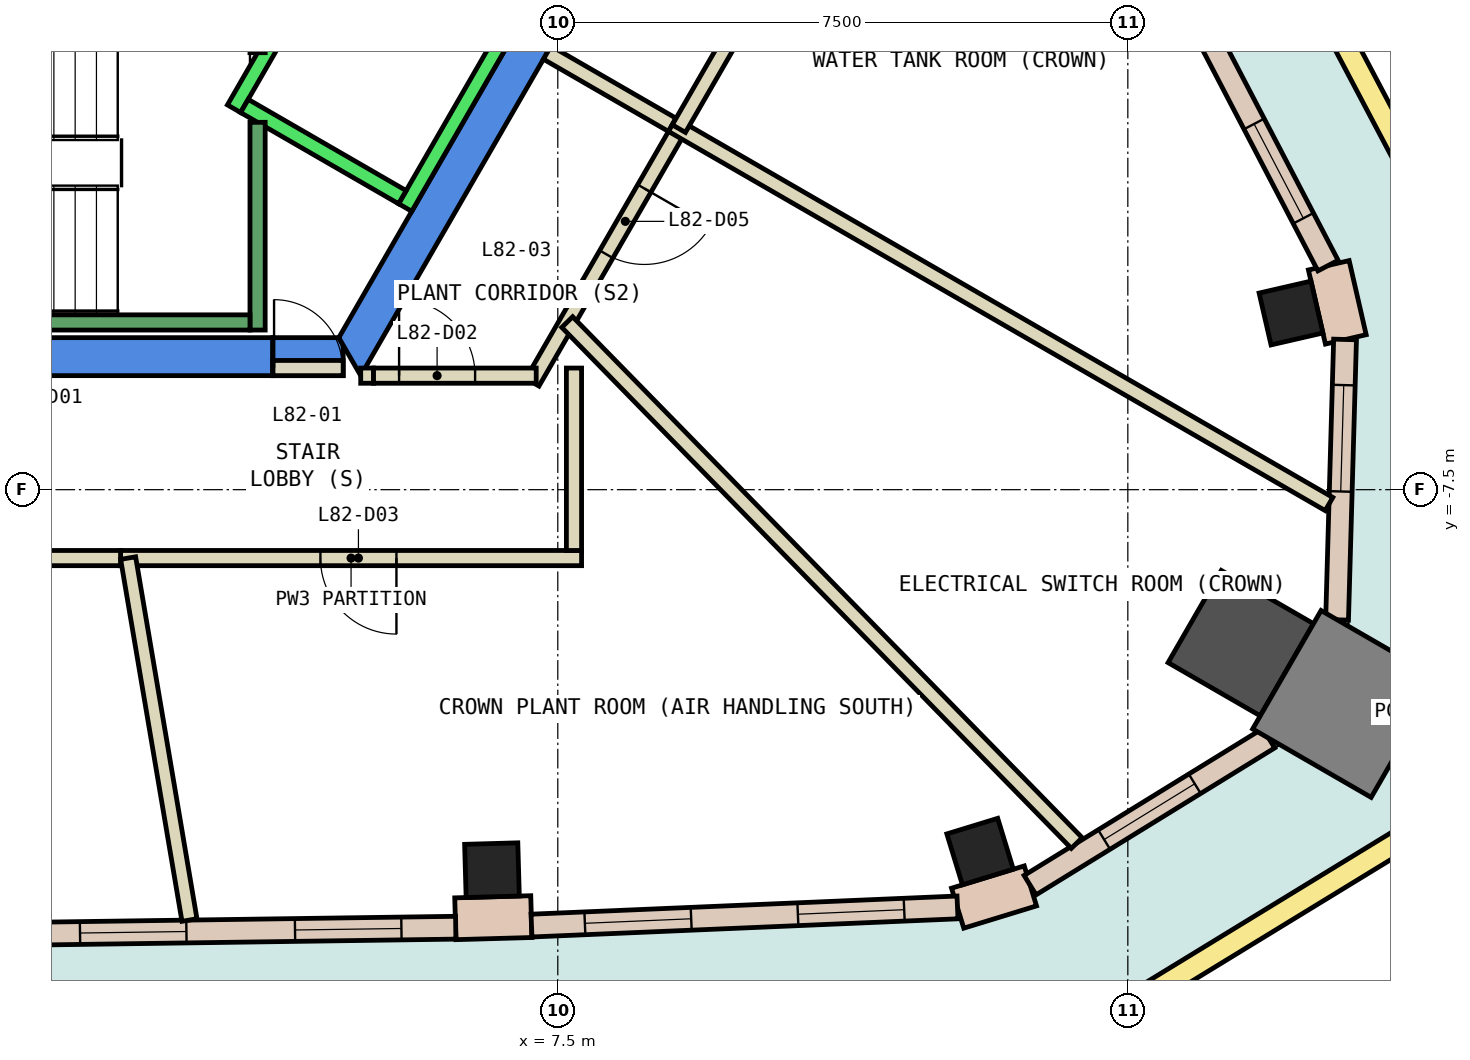
"""IFC4 building model, lengths in metres.
Left out: names, types, materials, properties, quantities, classifications, styles, units other than length and angle.
Written with IfcOpenShell. Run it as: python <this file> out.ifc"""

import sys

from ifc_helpers import new_model, si_unit, direction, frame, frame_2d, origin, origin_2d, place, context, subcontext, project, spatial, polyline, rectangle, outline, extrude, element, fill, save


model = new_model("IFC4")
c1 = context("Model", 3, precision=1e-05, world=origin(), true_north=direction((0.0, 1.0)))
c2 = subcontext(c1, "Body", "Model", "MODEL_VIEW")
j1 = project(units=[si_unit("LENGTHUNIT", "METRE"), si_unit("PLANEANGLEUNIT", "RADIAN")], contexts=[c1])
p1 = place(None, origin())
s1 = spatial("IfcSite", under=j1, at=p1, CompositionType="ELEMENT")
p2 = place(p1, origin())
s2 = spatial("IfcBuilding", under=s1, at=p2, CompositionType="ELEMENT")
p3 = place(p2, frame((0.0, 0.0, 349.4)))
s3 = spatial("IfcBuildingStorey", under=s2, at=p3, CompositionType="ELEMENT", Elevation=349.4)
for number, where, z_axis, x_axis in (
    (1, (6.634, -12.506, 0.0), (0.0, 0.0, 1.0), (1.0, 0.028, 0.0)),
    (2, (13.056, -12.261, 0.0), (0.0, 0.0, 1.0), (0.956, 0.293, 0.0)),
):
    element("IfcColumn", number, at=place(p3, frame(where, z_axis=z_axis, x_axis=x_axis)), inside=s3, PredefinedType="COLUMN", context=c2, shape_type="SweptSolid", body=[
        extrude(rectangle(XDim=0.7, YDim=0.7, at=origin_2d()), origin(), (0.0, 0.0, 1.0), 4.15),
    ])
p4 = place(p3, frame((16.486, -9.519, 0.0), z_axis=(0.0, 0.0, 1.0), x_axis=(-0.866025403784, 0.5, 0.0)))
e3 = element("IfcColumn", 3, at=p4, inside=s3, PredefinedType="COLUMN", context=c2, shape_type="SweptSolid", body=[
    extrude(rectangle(XDim=1.4, YDim=1.4, at=origin_2d()), origin(), (0.0, 0.0, 1.0), 4.15),
])
p5 = place(p3, frame((17.147, -5.176, 0.0), z_axis=(0.0, 0.0, 1.0), x_axis=(-0.224406828383, 0.974495549182, 0.0)))
e4 = element("IfcColumn", 4, at=p5, inside=s3, PredefinedType="COLUMN", context=c2, shape_type="SweptSolid", body=[
    extrude(rectangle(XDim=0.7, YDim=0.7, at=origin_2d()), origin(), (0.0, 0.0, 1.0), 4.15),
])
p6 = place(p3, frame((17.872, -10.319, 0.0), z_axis=(0.0, 0.0, 1.0), x_axis=(-0.866025403784, 0.5, 0.0)))
e5 = element("IfcColumn", 5, at=p6, inside=s3, PredefinedType="COLUMN", context=c2, shape_type="SweptSolid", body=[
    extrude(rectangle(XDim=1.8, YDim=1.8, at=origin_2d()), origin(), (0.0, 0.0, 1.0), 4.15),
])
p7 = place(p3, frame((0.0, 0.0, -0.45)))
e6 = element("IfcWall", 6, at=p7, inside=s3, PredefinedType="SHEAR", context=c2, shape_type="SweptSolid", body=[
    extrude(outline(polyline([(3.75, -6.0), (3.75, -5.5), (-4.619, -5.5), (-4.907, -6.0), (3.75, -6.0)])), origin(), (0.0, 0.0, 1.0), 4.6),
])
p8 = place(p3, frame((0.0, 0.0, 3.6)))
e7 = element("IfcWall", 7, at=p8, inside=s3, PredefinedType="SHEAR", context=c2, shape_type="SweptSolid", body=[
    extrude(outline(polyline([(4.676, -6.0), (4.676, -5.6), (4.619, -5.5), (3.75, -5.5), (3.75, -6.0), (4.676, -6.0)])), origin(), (0.0, 0.0, 1.0), 0.55),
])
p9 = place(p3, frame((0.0, 0.0, -0.45)))
e8 = element("IfcWall", 8, at=p9, inside=s3, PredefinedType="SHEAR", context=c2, shape_type="SweptSolid", body=[
    extrude(outline(polyline([(4.907, -6.0), (9.815, 2.5), (9.238, 2.5), (4.619, -5.5), (4.907, -6.0)])), origin(), (0.0, 0.0, 1.0), 4.6),
])
p10 = place(p3, frame((17.868, -5.523, 0.0), z_axis=(0.0, 0.0, 1.0), x_axis=(-0.223825449309, 0.974629246556, 0.0)))
e9 = element("IfcWall", 9, at=p10, inside=s3, PredefinedType="STANDARD", context=c2, shape_type="SweptSolid", body=[
    extrude(rectangle(XDim=1.0, YDim=0.55, at=frame_2d((0.5, 0.0))), origin(), (0.0, 0.0, 1.0), 4.15),
])
p11 = place(p3, frame((6.152, -13.145, 0.0), z_axis=(0.0, 0.0, 1.0), x_axis=(0.999606097148, 0.028065112591, 0.0)))
e10 = element("IfcWall", 10, at=p11, inside=s3, PredefinedType="STANDARD", context=c2, shape_type="SweptSolid", body=[
    extrude(rectangle(XDim=1.0, YDim=0.55, at=frame_2d((0.5, 0.0))), origin(), (0.0, 0.0, 1.0), 4.15),
])
p12 = place(p3, frame((12.761, -13.006, 0.0), z_axis=(0.0, 0.0, 1.0), x_axis=(0.95613166039, 0.292937276563, 0.0)))
e11 = element("IfcWall", 11, at=p12, inside=s3, PredefinedType="STANDARD", context=c2, shape_type="SweptSolid", body=[
    extrude(rectangle(XDim=1.001, YDim=0.55, at=frame_2d((0.5, 0.0))), origin(), (0.0, 0.0, 1.0), 4.15),
])
p13 = place(p3, frame((0.499, -13.343, 0.0), z_axis=(0.0, 0.0, 1.0), x_axis=(0.99989985876, 0.014151764991, 0.0)))
e12 = element("IfcWall", 12, at=p13, inside=s3, PredefinedType="STANDARD", context=c2, shape_type="SweptSolid", body=[
    extrude(rectangle(XDim=5.658, YDim=0.3, at=frame_2d((2.829, 0.0))), origin(), (0.0, 0.0, 1.0), 4.15),
])
p14 = place(p13, frame((0.715, 0.0, 0.9)))
e13 = element("IfcOpeningElement", 13, at=p14, cuts=e12, PredefinedType="OPENING", context=c2, shape_type="SweptSolid", body=[
    extrude(rectangle(XDim=1.4, YDim=3.0, at=frame_2d((0.7, 1.5))), frame((0.0, 0.16, 0.0), z_axis=(0.0, -1.0, 0.0), x_axis=(1.0, 0.0, 0.0)), (0.0, 0.0, 1.0), 0.32),
])
p15 = place(p13, frame((3.544, 0.0, 0.9)))
e14 = element("IfcOpeningElement", 14, at=p15, cuts=e12, PredefinedType="OPENING", context=c2, shape_type="SweptSolid", body=[
    extrude(rectangle(XDim=1.4, YDim=3.0, at=frame_2d((0.7, 1.5))), frame((0.0, 0.16, 0.0), z_axis=(0.0, -1.0, 0.0), x_axis=(1.0, 0.0, 0.0)), (0.0, 0.0, 1.0), 0.32),
])
p16 = place(p3, frame((7.154, -13.235, 0.0), z_axis=(0.0, 0.0, 1.0), x_axis=(0.999092021685, 0.042604368378, 0.0)))
e15 = element("IfcWall", 15, at=p16, inside=s3, PredefinedType="STANDARD", context=c2, shape_type="SweptSolid", body=[
    extrude(rectangle(XDim=5.61, YDim=0.3, at=frame_2d((2.805, 0.0))), origin(), (0.0, 0.0, 1.0), 4.15),
])
p17 = place(p16, frame((0.703, 0.0, 0.9)))
e16 = element("IfcOpeningElement", 16, at=p17, cuts=e15, PredefinedType="OPENING", context=c2, shape_type="SweptSolid", body=[
    extrude(rectangle(XDim=1.4, YDim=3.0, at=frame_2d((0.7, 1.5))), frame((0.0, 0.16, 0.0), z_axis=(0.0, -1.0, 0.0), x_axis=(1.0, 0.0, 0.0)), (0.0, 0.0, 1.0), 0.32),
])
p18 = place(p16, frame((3.508, 0.0, 0.9)))
e17 = element("IfcOpeningElement", 17, at=p18, cuts=e15, PredefinedType="OPENING", context=c2, shape_type="SweptSolid", body=[
    extrude(rectangle(XDim=1.4, YDim=3.0, at=frame_2d((0.7, 1.5))), frame((0.0, 0.16, 0.0), z_axis=(0.0, -1.0, 0.0), x_axis=(1.0, 0.0, 0.0)), (0.0, 0.0, 1.0), 0.32),
])
p19 = place(p3, frame((13.714, -12.703, 0.0), z_axis=(0.0, 0.0, 1.0), x_axis=(0.851583283947, 0.524219334345, 0.0)))
e18 = element("IfcWall", 18, at=p19, inside=s3, PredefinedType="STANDARD", context=c2, shape_type="SweptSolid", body=[
    extrude(rectangle(XDim=3.687, YDim=0.3, at=frame_2d((1.844, 0.0))), origin(), (0.0, 0.0, 1.0), 4.15),
])
p20 = place(p19, frame((1.144, 0.0, 0.9)))
e19 = element("IfcOpeningElement", 19, at=p20, cuts=e18, PredefinedType="OPENING", context=c2, shape_type="SweptSolid", body=[
    extrude(rectangle(XDim=1.4, YDim=3.0, at=frame_2d((0.7, 1.5))), frame((0.0, 0.16, 0.0), z_axis=(0.0, -1.0, 0.0), x_axis=(1.0, 0.0, 0.0)), (0.0, 0.0, 1.0), 0.32),
])
p21 = place(p3, frame((17.753, -9.212, 0.0), z_axis=(0.0, 0.0, 1.0), x_axis=(0.028453984805, 0.999595103404, 0.0)))
e20 = element("IfcWall", 20, at=p21, inside=s3, PredefinedType="STANDARD", context=c2, shape_type="SweptSolid", body=[
    extrude(rectangle(XDim=3.689, YDim=0.3, at=frame_2d((1.845, 0.0))), origin(), (0.0, 0.0, 1.0), 4.15),
])
p22 = place(p21, frame((1.689, 0.0, 0.9)))
e21 = element("IfcOpeningElement", 21, at=p22, cuts=e20, PredefinedType="OPENING", context=c2, shape_type="SweptSolid", body=[
    extrude(rectangle(XDim=1.4, YDim=3.0, at=frame_2d((0.7, 1.5))), frame((0.0, 0.16, 0.0), z_axis=(0.0, -1.0, 0.0), x_axis=(1.0, 0.0, 0.0)), (0.0, 0.0, 1.0), 0.32),
])
p23 = place(p3, frame((17.634, -4.552, 0.0), z_axis=(0.0, 0.0, 1.0), x_axis=(-0.462629991654, 0.886551459771, 0.0)))
e22 = element("IfcWall", 22, at=p23, inside=s3, PredefinedType="STANDARD", context=c2, shape_type="SweptSolid", body=[
    extrude(rectangle(XDim=5.607, YDim=0.3, at=frame_2d((2.804, 0.0))), origin(), (0.0, 0.0, 1.0), 4.15),
])
p24 = place(p23, frame((0.702, 0.0, 0.9)))
e23 = element("IfcOpeningElement", 23, at=p24, cuts=e22, PredefinedType="OPENING", context=c2, shape_type="SweptSolid", body=[
    extrude(rectangle(XDim=1.4, YDim=3.0, at=frame_2d((0.7, 1.5))), frame((0.0, 0.16, 0.0), z_axis=(0.0, -1.0, 0.0), x_axis=(1.0, 0.0, 0.0)), (0.0, 0.0, 1.0), 0.32),
])
p25 = place(p23, frame((3.505, 0.0, 0.9)))
e24 = element("IfcOpeningElement", 24, at=p25, cuts=e22, PredefinedType="OPENING", context=c2, shape_type="SweptSolid", body=[
    extrude(rectangle(XDim=1.4, YDim=3.0, at=frame_2d((0.7, 1.5))), frame((0.0, 0.16, 0.0), z_axis=(0.0, -1.0, 0.0), x_axis=(1.0, 0.0, 0.0)), (0.0, 0.0, 1.0), 0.32),
])
p26 = place(p3, origin())
e25 = element("IfcWall", 25, at=p26, inside=s3, PredefinedType="PARAPET", context=c2, shape_type="SweptSolid", body=[
    extrude(outline(polyline([(14.757, -14.63), (19.898, -11.488), (19.602, -11.317), (14.667, -14.333), (14.757, -14.63)])), origin(), (0.0, 0.0, 1.0), 1.1),
])
p27 = place(p3, origin())
e26 = element("IfcWall", 26, at=p27, inside=s3, PredefinedType="PARAPET", context=c2, shape_type="SweptSolid", body=[
    extrude(outline(polyline([(20.049, -5.465), (16.601, 1.062), (16.338, 0.919), (19.747, -5.536), (20.049, -5.465)])), origin(), (0.0, 0.0, 1.0), 1.1),
])
p28 = place(p3, frame((4.907, -6.0, 0.0), z_axis=(0.0, 0.0, 1.0), x_axis=(1.0, 0.0, 0.0)))
e27 = element("IfcWall", 27, at=p28, inside=s3, PredefinedType="PARTITIONING", context=c2, shape_type="SweptSolid", body=[
    extrude(rectangle(XDim=0.169, YDim=0.2, at=frame_2d((0.084, 0.0))), origin(), (0.0, 0.0, 1.0), 2.4),
])
p29 = place(p3, frame((7.813, -8.4, 0.0), z_axis=(0.0, 0.0, 1.0), x_axis=(-1.0, 0.0, 0.0)))
e28 = element("IfcWall", 28, at=p29, inside=s3, PredefinedType="PARTITIONING", context=c2, shape_type="SweptSolid", body=[
    extrude(rectangle(XDim=6.066, YDim=0.2, at=frame_2d((3.033, 0.0))), origin(), (0.0, 0.0, 1.0), 4.15),
])
p30 = place(p29, frame((2.436, 0.0, 0.0)))
e29 = element("IfcOpeningElement", 29, at=p30, cuts=e28, PredefinedType="OPENING", context=c2, shape_type="SweptSolid", body=[
    extrude(rectangle(XDim=1.0, YDim=2.1, at=frame_2d((0.5, 1.05))), frame((0.0, 0.11, 0.0), z_axis=(0.0, -1.0, 0.0), x_axis=(1.0, 0.0, 0.0)), (0.0, 0.0, 1.0), 0.22),
])
p31 = place(p3, frame((7.713, -5.9, 0.0), z_axis=(0.0, 0.0, 1.0), x_axis=(0.0, -1.0, 0.0)))
e30 = element("IfcWall", 30, at=p31, inside=s3, PredefinedType="PARTITIONING", context=c2, shape_type="SweptSolid", body=[
    extrude(rectangle(XDim=2.4, YDim=0.2, at=frame_2d((1.2, 0.0))), origin(), (0.0, 0.0, 1.0), 4.15),
])
p32 = place(p3, frame((1.747, -8.4, 0.0), z_axis=(0.0, 0.0, 1.0), x_axis=(-1.0, 0.0, 0.0)))
e31 = element("IfcWall", 31, at=p32, inside=s3, PredefinedType="PARTITIONING", context=c2, shape_type="SweptSolid", body=[
    extrude(rectangle(XDim=1.134, YDim=0.2, at=frame_2d((0.567, 0.0))), origin(), (0.0, 0.0, 1.0), 4.15),
])
p33 = place(p3, frame((9.093, -2.75, 0.0), z_axis=(0.0, 0.0, 1.0), x_axis=(-0.500084415177, -0.865976661173, 0.0)))
e32 = element("IfcWall", 32, at=p33, inside=s3, PredefinedType="PARTITIONING", context=c2, shape_type="SweptSolid", body=[
    extrude(rectangle(XDim=3.853, YDim=0.2, at=frame_2d((1.927, 0.0))), origin(), (0.0, 0.0, 1.0), 4.15),
])
p34 = place(p33, frame((0.909, 0.0, 0.0)))
e33 = element("IfcOpeningElement", 33, at=p34, cuts=e32, PredefinedType="OPENING", context=c2, shape_type="SweptSolid", body=[
    extrude(rectangle(XDim=1.0, YDim=2.1, at=frame_2d((0.5, 1.05))), frame((0.0, 0.11, 0.0), z_axis=(0.0, -1.0, 0.0), x_axis=(1.0, 0.0, 0.0)), (0.0, 0.0, 1.0), 0.22),
])
p35 = place(p3, frame((7.361, -1.75, 0.0), z_axis=(0.0, 0.0, 1.0), x_axis=(0.865980106173, -0.500078449558, 0.0)))
e34 = element("IfcWall", 34, at=p35, inside=s3, PredefinedType="PARTITIONING", context=c2, shape_type="SweptSolid", body=[
    extrude(rectangle(XDim=1.9, YDim=0.2, at=frame_2d((0.95, 0.0))), origin(), (0.0, 0.0, 1.0), 4.15),
])
p36 = place(p3, frame((2.654, -13.162, 0.0), z_axis=(0.0, 0.0, 1.0), x_axis=(-0.167103233432, 0.985939404516, 0.0)))
e35 = element("IfcWall", 35, at=p36, inside=s3, PredefinedType="PARTITIONING", context=c2, shape_type="SweptSolid", body=[
    extrude(rectangle(XDim=4.83, YDim=0.2, at=frame_2d((2.415, 0.0))), origin(), (0.0, 0.0, 1.0), 4.15),
])
p37 = place(p3, frame((7.624, -5.295, 0.0), z_axis=(0.0, 0.0, 1.0), x_axis=(0.699233052575, -0.71489379504, 0.0)))
e36 = element("IfcWall", 36, at=p37, inside=s3, PredefinedType="PARTITIONING", context=c2, shape_type="SweptSolid", body=[
    extrude(rectangle(XDim=9.587, YDim=0.2, at=frame_2d((4.794, 0.0))), origin(), (0.0, 0.0, 1.0), 4.15),
])
p38 = place(p3, frame((9.006, -2.7, 0.0), z_axis=(0.0, 0.0, 1.0), x_axis=(0.866016483303, -0.500015450408, 0.0)))
e37 = element("IfcWall", 37, at=p38, inside=s3, PredefinedType="PARTITIONING", context=c2, shape_type="SweptSolid", body=[
    extrude(rectangle(XDim=9.978, YDim=0.2, at=frame_2d((4.989, 0.0))), origin(), (0.0, 0.0, 1.0), 4.15),
])
p39 = place(p3, frame((12.074, 2.413, 0.0), z_axis=(0.0, 0.0, 1.0), x_axis=(-0.500006035293, -0.866021919278, 0.0)))
e38 = element("IfcWall", 38, at=p39, inside=s3, PredefinedType="PARTITIONING", context=c2, shape_type="SweptSolid", body=[
    extrude(rectangle(XDim=5.962, YDim=0.2, at=frame_2d((2.981, 0.0))), origin(), (0.0, 0.0, 1.0), 4.15),
])
p40 = place(p3, frame((3.75, -5.9, 0.0), z_axis=(0.0, 0.0, 1.0), x_axis=(1.0, 0.0, 0.0)))
e39 = element("IfcWall", 39, at=p40, inside=s3, PredefinedType="PARTITIONING", context=c2, shape_type="SweptSolid", body=[
    extrude(rectangle(XDim=0.926, YDim=0.2, at=frame_2d((0.463, 0.0))), origin(), (0.0, 0.0, 1.0), 2.4),
])
p41 = place(p40, frame((0.017, 0.0, 0.0)))
e40 = element("IfcOpeningElement", 40, at=p41, cuts=e39, PredefinedType="OPENING", context=c2, shape_type="SweptSolid", body=[
    extrude(rectangle(XDim=0.9, YDim=2.1, at=frame_2d((0.45, 1.05))), frame((0.0, 0.11, 0.0), z_axis=(0.0, -1.0, 0.0), x_axis=(1.0, 0.0, 0.0)), (0.0, 0.0, 1.0), 0.22),
])
p42 = place(p3, frame((5.076, -6.0, 0.0), z_axis=(0.0, 0.0, 1.0), x_axis=(1.0, 0.0, 0.0)))
e41 = element("IfcWall", 41, at=p42, inside=s3, PredefinedType="PARTITIONING", context=c2, shape_type="SweptSolid", body=[
    extrude(rectangle(XDim=2.14, YDim=0.2, at=frame_2d((1.07, 0.0))), origin(), (0.0, 0.0, 1.0), 4.15),
])
p43 = place(p42, frame((0.336, 0.0, 0.0)))
e42 = element("IfcOpeningElement", 42, at=p43, cuts=e41, PredefinedType="OPENING", context=c2, shape_type="SweptSolid", body=[
    extrude(rectangle(XDim=1.0, YDim=2.1, at=frame_2d((0.5, 1.05))), frame((0.0, 0.11, 0.0), z_axis=(0.0, -1.0, 0.0), x_axis=(1.0, 0.0, 0.0)), (0.0, 0.0, 1.0), 0.22),
])
p44 = place(p3, frame((3.24, -2.488, 0.0), z_axis=(0.0, 0.0, 1.0), x_axis=(0.500034260056, 0.866005622828, 0.0)))
e43 = element("IfcWall", 43, at=p44, inside=s3, PredefinedType="STANDARD", context=c2, shape_type="SweptSolid", body=[
    extrude(rectangle(XDim=5.399, YDim=0.2, at=frame_2d((2.7, 0.0))), origin(), (0.0, 0.0, 1.0), 4.15),
])
p45 = place(p44, frame((1.225, 0.0, 0.0)))
e44 = element("IfcOpeningElement", 44, at=p45, cuts=e43, PredefinedType="OPENING", context=c2, shape_type="SweptSolid", body=[
    extrude(rectangle(XDim=1.1, YDim=2.1, at=frame_2d((0.55, 1.05))), frame((0.0, 0.11, 0.0), z_axis=(0.0, -1.0, 0.0), x_axis=(1.0, 0.0, 0.0)), (0.0, 0.0, 1.0), 0.22),
])
p46 = place(p3, frame((5.492, -3.788, 0.0), z_axis=(0.0, 0.0, 1.0), x_axis=(0.500034260056, 0.866005622828, 0.0)))
e45 = element("IfcWall", 45, at=p46, inside=s3, PredefinedType="STANDARD", context=c2, shape_type="SweptSolid", body=[
    extrude(rectangle(XDim=5.399, YDim=0.2, at=frame_2d((2.7, 0.0))), origin(), (0.0, 0.0, 1.0), 4.15),
])
p47 = place(p3, frame((3.377, -2.452, 0.0), z_axis=(0.0, 0.0, 1.0), x_axis=(0.865955154139, -0.50012165622, 0.0)))
e46 = element("IfcWall", 46, at=p47, inside=s3, PredefinedType="STANDARD", context=c2, shape_type="SweptSolid", body=[
    extrude(rectangle(XDim=2.4, YDim=0.2, at=frame_2d((1.2, 0.0))), origin(), (0.0, 0.0, 1.0), 4.15),
])
p48 = place(p3, frame((3.55, -2.667, 0.0), z_axis=(0.0, 0.0, 1.0), x_axis=(0.0, -1.0, 0.0)))
e47 = element("IfcWall", 47, at=p48, inside=s3, PredefinedType="STANDARD", context=c2, shape_type="SweptSolid", body=[
    extrude(rectangle(XDim=2.733, YDim=0.2, at=frame_2d((1.366, 0.0))), origin(), (0.0, 0.0, 1.0), 4.15),
])
p49 = place(p3, frame((3.55, -1.0, 0.0), z_axis=(0.0, 0.0, 1.0), x_axis=(0.0, -1.0, 0.0)))
e48 = element("IfcWall", 48, at=p49, inside=s3, PredefinedType="STANDARD", context=c2, shape_type="SweptSolid", body=[
    extrude(rectangle(XDim=0.751, YDim=0.2, at=frame_2d((0.375, 0.0))), origin(), (0.0, 0.0, 1.0), 4.15),
])
p50 = place(p3, frame((-3.45, -5.3, 0.0), z_axis=(0.0, 0.0, 1.0), x_axis=(1.0, 0.0, 0.0)))
e49 = element("IfcWall", 49, at=p50, inside=s3, PredefinedType="STANDARD", context=c2, shape_type="SweptSolid", body=[
    extrude(rectangle(XDim=6.9, YDim=0.2, at=frame_2d((3.45, 0.0))), origin(), (0.0, 0.0, 1.0), 4.15),
])
p51 = place(p14, origin())
e50 = element("IfcWindow", 50, at=p51, inside=s3, PartitioningType="SINGLE_PANEL", PredefinedType="WINDOW", context=c2, shape_type="SweptSolid", body=[
    extrude(rectangle(XDim=1.4, YDim=3.0, at=frame_2d((0.7, 1.5))), frame((0.0, 0.03, 0.0), z_axis=(0.0, -1.0, 0.0), x_axis=(1.0, 0.0, 0.0)), (0.0, 0.0, 1.0), 0.06),
])
fill(e13, e50)
p52 = place(p15, origin())
e51 = element("IfcWindow", 51, at=p52, inside=s3, PartitioningType="SINGLE_PANEL", PredefinedType="WINDOW", context=c2, shape_type="SweptSolid", body=[
    extrude(rectangle(XDim=1.4, YDim=3.0, at=frame_2d((0.7, 1.5))), frame((0.0, 0.03, 0.0), z_axis=(0.0, -1.0, 0.0), x_axis=(1.0, 0.0, 0.0)), (0.0, 0.0, 1.0), 0.06),
])
fill(e14, e51)
p53 = place(p17, origin())
e52 = element("IfcWindow", 52, at=p53, inside=s3, PartitioningType="SINGLE_PANEL", PredefinedType="WINDOW", context=c2, shape_type="SweptSolid", body=[
    extrude(rectangle(XDim=1.4, YDim=3.0, at=frame_2d((0.7, 1.5))), frame((0.0, 0.03, 0.0), z_axis=(0.0, -1.0, 0.0), x_axis=(1.0, 0.0, 0.0)), (0.0, 0.0, 1.0), 0.06),
])
fill(e16, e52)
p54 = place(p18, origin())
e53 = element("IfcWindow", 53, at=p54, inside=s3, PartitioningType="SINGLE_PANEL", PredefinedType="WINDOW", context=c2, shape_type="SweptSolid", body=[
    extrude(rectangle(XDim=1.4, YDim=3.0, at=frame_2d((0.7, 1.5))), frame((0.0, 0.03, 0.0), z_axis=(0.0, -1.0, 0.0), x_axis=(1.0, 0.0, 0.0)), (0.0, 0.0, 1.0), 0.06),
])
fill(e17, e53)
p55 = place(p20, origin())
e54 = element("IfcWindow", 54, at=p55, inside=s3, PartitioningType="SINGLE_PANEL", PredefinedType="WINDOW", context=c2, shape_type="SweptSolid", body=[
    extrude(rectangle(XDim=1.4, YDim=3.0, at=frame_2d((0.7, 1.5))), frame((0.0, 0.03, 0.0), z_axis=(0.0, -1.0, 0.0), x_axis=(1.0, 0.0, 0.0)), (0.0, 0.0, 1.0), 0.06),
])
fill(e19, e54)
p56 = place(p22, origin())
e55 = element("IfcWindow", 55, at=p56, inside=s3, PartitioningType="SINGLE_PANEL", PredefinedType="WINDOW", context=c2, shape_type="SweptSolid", body=[
    extrude(rectangle(XDim=1.4, YDim=3.0, at=frame_2d((0.7, 1.5))), frame((0.0, 0.03, 0.0), z_axis=(0.0, -1.0, 0.0), x_axis=(1.0, 0.0, 0.0)), (0.0, 0.0, 1.0), 0.06),
])
fill(e21, e55)
p57 = place(p24, origin())
e56 = element("IfcWindow", 56, at=p57, inside=s3, PartitioningType="SINGLE_PANEL", PredefinedType="WINDOW", context=c2, shape_type="SweptSolid", body=[
    extrude(rectangle(XDim=1.4, YDim=3.0, at=frame_2d((0.7, 1.5))), frame((0.0, 0.03, 0.0), z_axis=(0.0, -1.0, 0.0), x_axis=(1.0, 0.0, 0.0)), (0.0, 0.0, 1.0), 0.06),
])
fill(e23, e56)
p58 = place(p43, origin())
e57 = element("IfcDoor", 57, at=p58, inside=s3, OperationType="SINGLE_SWING_RIGHT", PredefinedType="DOOR", context=c2, shape_type="SweptSolid", body=[
    extrude(rectangle(XDim=1.0, YDim=2.1, at=frame_2d((0.5, 1.05))), frame((0.0, 0.025, 0.0), z_axis=(0.0, -1.0, 0.0), x_axis=(1.0, 0.0, 0.0)), (0.0, 0.0, 1.0), 0.05),
])
fill(e42, e57)
p59 = place(p30, origin())
e58 = element("IfcDoor", 58, at=p59, inside=s3, OperationType="SINGLE_SWING_LEFT", PredefinedType="DOOR", context=c2, shape_type="SweptSolid", body=[
    extrude(rectangle(XDim=1.0, YDim=2.1, at=frame_2d((0.5, 1.05))), frame((0.0, 0.025, 0.0), z_axis=(0.0, -1.0, 0.0), x_axis=(1.0, 0.0, 0.0)), (0.0, 0.0, 1.0), 0.05),
])
fill(e29, e58)
p60 = place(p34, origin())
e59 = element("IfcDoor", 59, at=p60, inside=s3, OperationType="SINGLE_SWING_LEFT", PredefinedType="DOOR", context=c2, shape_type="SweptSolid", body=[
    extrude(rectangle(XDim=1.0, YDim=2.1, at=frame_2d((0.5, 1.05))), frame((0.0, 0.025, 0.0), z_axis=(0.0, -1.0, 0.0), x_axis=(1.0, 0.0, 0.0)), (0.0, 0.0, 1.0), 0.05),
])
fill(e33, e59)
p61 = place(p41, origin())
e60 = element("IfcDoor", 60, at=p61, inside=s3, OperationType="SINGLE_SWING_LEFT", PredefinedType="DOOR", context=c2, shape_type="SweptSolid", body=[
    extrude(rectangle(XDim=0.9, YDim=2.1, at=frame_2d((0.45, 1.05))), frame((0.0, 0.025, 0.0), z_axis=(0.0, -1.0, 0.0), x_axis=(1.0, 0.0, 0.0)), (0.0, 0.0, 1.0), 0.05),
])
fill(e40, e60)
save(model, sys.argv[1])
